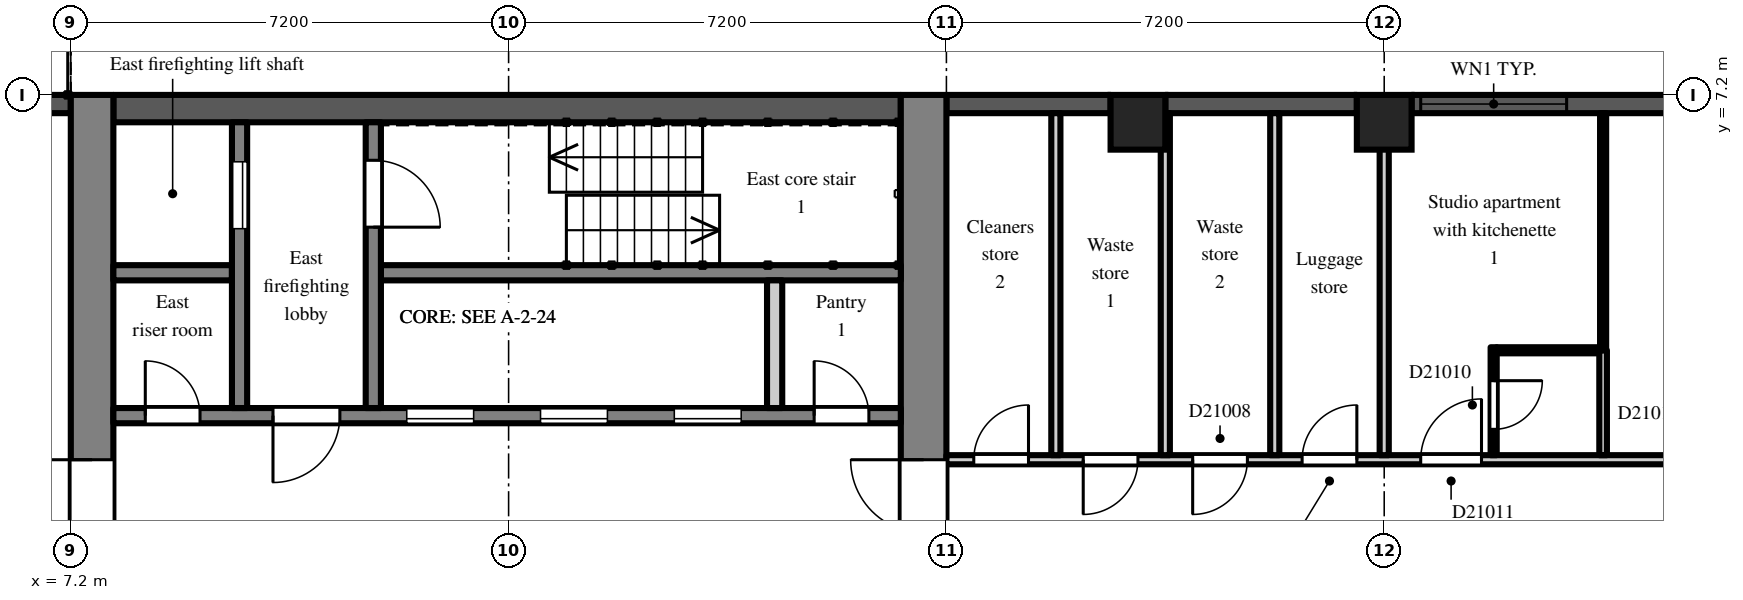
"""IFC4 building model, lengths in metres.
Left out: names, types, materials, properties, quantities, classifications, styles, units other than length and angle.
Written with IfcOpenShell. Run it as: python <this file> out.ifc"""

import sys

from ifc_helpers import new_model, si_unit, direction, frame, frame_2d, origin, origin_2d, place, context, subcontext, project, spatial, rectangle, extrude, element, fill, save


model = new_model("IFC4")
c1 = context("Model", 3, precision=1e-05, world=origin(), true_north=direction((0.0, 1.0)))
c2 = subcontext(c1, "Body", "Model", "MODEL_VIEW")
j1 = project(units=[si_unit("LENGTHUNIT", "METRE"), si_unit("PLANEANGLEUNIT", "RADIAN")], contexts=[c1])
p1 = place(None, origin())
s1 = spatial("IfcSite", under=j1, at=p1, CompositionType="ELEMENT")
p2 = place(p1, origin())
s2 = spatial("IfcBuilding", under=s1, at=p2, CompositionType="ELEMENT")
p3 = place(p2, frame((0.0, 0.0, 147.3)))
s3 = spatial("IfcBuildingStorey", under=s2, at=p3, CompositionType="ELEMENT", Elevation=147.3)
for number, where, z_axis, x_axis in (
    (1, (24.75, 6.75, 0.0), (0.0, 0.0, 1.0), (1.0, 0.0, 0.0)),
    (2, (28.8, 6.75, 0.0), (0.0, 0.0, 1.0), (1.0, 0.0, 0.0)),
):
    element("IfcColumn", number, at=place(p3, frame(where, z_axis=z_axis, x_axis=x_axis)), inside=s3, PredefinedType="COLUMN", context=c2, shape_type="SweptSolid", body=[
        extrude(rectangle(XDim=0.9, YDim=0.9, at=origin_2d()), origin(), (0.0, 0.0, 1.0), 3.0),
    ])
p4 = place(p3, frame((35.55, 7.05, 0.0), z_axis=(0.0, 0.0, 1.0), x_axis=(-1.0, 0.0, 0.0)))
e3 = element("IfcWall", 3, at=p4, inside=s3, PredefinedType="SOLIDWALL", context=c2, shape_type="SweptSolid", body=[
    extrude(rectangle(XDim=6.3, YDim=0.3, at=frame_2d((3.15, 0.0))), origin(), (0.0, 0.0, 1.0), 2.2),
])
p5 = place(p4, frame((3.75, 0.0, 0.2)))
e4 = element("IfcOpeningElement", 4, at=p5, cuts=e3, PredefinedType="OPENING", context=c2, shape_type="SweptSolid", body=[
    extrude(rectangle(XDim=2.4, YDim=1.85, at=frame_2d((1.2, 0.925))), frame((0.0, 0.16, 0.0), z_axis=(0.0, -1.0, 0.0), x_axis=(1.0, 0.0, 0.0)), (0.0, 0.0, 1.0), 0.32),
])
p6 = place(p3, frame((28.35, 7.05, 0.0), z_axis=(0.0, 0.0, 1.0), x_axis=(-1.0, 0.0, 0.0)))
e5 = element("IfcWall", 5, at=p6, inside=s3, PredefinedType="SOLIDWALL", context=c2, shape_type="SweptSolid", body=[
    extrude(rectangle(XDim=3.15, YDim=0.3, at=frame_2d((1.575, 0.0))), origin(), (0.0, 0.0, 1.0), 2.2),
])
p7 = place(p3, frame((24.3, 7.05, 0.0), z_axis=(0.0, 0.0, 1.0), x_axis=(-1.0, 0.0, 0.0)))
e6 = element("IfcWall", 6, at=p7, inside=s3, PredefinedType="SOLIDWALL", context=c2, shape_type="SweptSolid", body=[
    extrude(rectangle(XDim=2.7, YDim=0.3, at=frame_2d((1.35, 0.0))), origin(), (0.0, 0.0, 1.0), 2.2),
])
p8 = place(p3, frame((7.2, 7.05, 0.0), z_axis=(0.0, 0.0, 1.0), x_axis=(-1.0, 0.0, 0.0)))
e7 = element("IfcWall", 7, at=p8, inside=s3, PredefinedType="SOLIDWALL", context=c2, shape_type="SweptSolid", body=[
    extrude(rectangle(XDim=3.0, YDim=0.3, at=frame_2d((1.5, 0.0))), origin(), (0.0, 0.0, 1.0), 2.2),
])
p9 = place(p3, frame((7.55, -7.2, 0.0), z_axis=(0.0, 0.0, 1.0), x_axis=(0.0, 1.0, 0.0)))
e8 = element("IfcWall", 8, at=p9, inside=s3, PredefinedType="SHEAR", context=c2, shape_type="SweptSolid", body=[
    extrude(rectangle(XDim=14.4, YDim=0.7, at=frame_2d((7.2, 0.0))), origin(), (0.0, 0.0, 1.0), 2.6),
])
p10 = place(p9, frame((6.0, 0.0, 0.0)))
e9 = element("IfcOpeningElement", 9, at=p10, cuts=e8, PredefinedType="OPENING", context=c2, shape_type="SweptSolid", body=[
    extrude(rectangle(XDim=2.4, YDim=2.2, at=frame_2d((1.2, 1.1))), frame((0.0, 0.36, 0.0), z_axis=(0.0, -1.0, 0.0), x_axis=(1.0, 0.0, 0.0)), (0.0, 0.0, 1.0), 0.72),
])
p11 = place(p3, frame((21.225, -7.2, 0.0), z_axis=(0.0, 0.0, 1.0), x_axis=(0.0, 1.0, 0.0)))
e10 = element("IfcWall", 10, at=p11, inside=s3, PredefinedType="SHEAR", context=c2, shape_type="SweptSolid", body=[
    extrude(rectangle(XDim=14.4, YDim=0.75, at=frame_2d((7.2, 0.0))), origin(), (0.0, 0.0, 1.0), 2.6),
])
p12 = place(p11, frame((6.0, 0.0, 0.0)))
e11 = element("IfcOpeningElement", 11, at=p12, cuts=e10, PredefinedType="OPENING", context=c2, shape_type="SweptSolid", body=[
    extrude(rectangle(XDim=2.4, YDim=2.2, at=frame_2d((1.2, 1.1))), frame((0.0, 0.385, 0.0), z_axis=(0.0, -1.0, 0.0), x_axis=(1.0, 0.0, 0.0)), (0.0, 0.0, 1.0), 0.77),
])
p13 = place(p3, frame((7.9, 6.975, 0.0), z_axis=(0.0, 0.0, 1.0), x_axis=(1.0, 0.0, 0.0)))
e12 = element("IfcWall", 12, at=p13, inside=s3, PredefinedType="SHEAR", context=c2, shape_type="SweptSolid", body=[
    extrude(rectangle(XDim=12.95, YDim=0.45, at=frame_2d((6.475, 0.0))), origin(), (0.0, 0.0, 1.0), 2.6),
])
p14 = place(p3, frame((7.9, 1.925, 0.0), z_axis=(0.0, 0.0, 1.0), x_axis=(1.0, 0.0, 0.0)))
e13 = element("IfcWall", 13, at=p14, inside=s3, PredefinedType="SHEAR", context=c2, shape_type="SweptSolid", body=[
    extrude(rectangle(XDim=12.95, YDim=0.25, at=frame_2d((6.475, 0.0))), origin(), (0.0, 0.0, 1.0), 2.6),
])
p15 = place(p14, frame((4.825, 0.0, 0.0)))
e14 = element("IfcOpeningElement", 14, at=p15, cuts=e13, PredefinedType="OPENING", context=c2, shape_type="SweptSolid", body=[
    extrude(rectangle(XDim=1.1, YDim=2.1, at=frame_2d((0.55, 1.05))), frame((0.0, 0.135, 0.0), z_axis=(0.0, -1.0, 0.0), x_axis=(1.0, 0.0, 0.0)), (0.0, 0.0, 1.0), 0.27),
])
p16 = place(p14, frame((7.025, 0.0, 0.0)))
e15 = element("IfcOpeningElement", 15, at=p16, cuts=e13, PredefinedType="OPENING", context=c2, shape_type="SweptSolid", body=[
    extrude(rectangle(XDim=1.1, YDim=2.1, at=frame_2d((0.55, 1.05))), frame((0.0, 0.135, 0.0), z_axis=(0.0, -1.0, 0.0), x_axis=(1.0, 0.0, 0.0)), (0.0, 0.0, 1.0), 0.27),
])
p17 = place(p14, frame((9.225, 0.0, 0.0)))
e16 = element("IfcOpeningElement", 16, at=p17, cuts=e13, PredefinedType="OPENING", context=c2, shape_type="SweptSolid", body=[
    extrude(rectangle(XDim=1.1, YDim=2.1, at=frame_2d((0.55, 1.05))), frame((0.0, 0.135, 0.0), z_axis=(0.0, -1.0, 0.0), x_axis=(1.0, 0.0, 0.0)), (0.0, 0.0, 1.0), 0.27),
])
p18 = place(p14, frame((0.525, 0.0, 0.0)))
e17 = element("IfcOpeningElement", 17, at=p18, cuts=e13, PredefinedType="OPENING", context=c2, shape_type="SweptSolid", body=[
    extrude(rectangle(XDim=0.9, YDim=2.1, at=frame_2d((0.45, 1.05))), frame((0.0, 0.135, 0.0), z_axis=(0.0, -1.0, 0.0), x_axis=(1.0, 0.0, 0.0)), (0.0, 0.0, 1.0), 0.27),
])
p19 = place(p14, frame((2.625, 0.0, 0.0)))
e18 = element("IfcOpeningElement", 18, at=p19, cuts=e13, PredefinedType="OPENING", context=c2, shape_type="SweptSolid", body=[
    extrude(rectangle(XDim=1.1, YDim=2.1, at=frame_2d((0.55, 1.05))), frame((0.0, 0.135, 0.0), z_axis=(0.0, -1.0, 0.0), x_axis=(1.0, 0.0, 0.0)), (0.0, 0.0, 1.0), 0.27),
])
p20 = place(p14, frame((11.525, 0.0, 0.0)))
e19 = element("IfcOpeningElement", 19, at=p20, cuts=e13, PredefinedType="OPENING", context=c2, shape_type="SweptSolid", body=[
    extrude(rectangle(XDim=0.9, YDim=2.1, at=frame_2d((0.45, 1.05))), frame((0.0, 0.135, 0.0), z_axis=(0.0, -1.0, 0.0), x_axis=(1.0, 0.0, 0.0)), (0.0, 0.0, 1.0), 0.27),
])
p21 = place(p3, frame((7.9, 4.275, 0.0), z_axis=(0.0, 0.0, 1.0), x_axis=(1.0, 0.0, 0.0)))
e20 = element("IfcWall", 20, at=p21, inside=s3, PredefinedType="SHEAR", context=c2, shape_type="SweptSolid", body=[
    extrude(rectangle(XDim=1.95, YDim=0.25, at=frame_2d((0.975, 0.0))), origin(), (0.0, 0.0, 1.0), 2.6),
])
p22 = place(p3, frame((12.3, 4.275, 0.0), z_axis=(0.0, 0.0, 1.0), x_axis=(1.0, 0.0, 0.0)))
e21 = element("IfcWall", 21, at=p22, inside=s3, PredefinedType="SHEAR", context=c2, shape_type="SweptSolid", body=[
    extrude(rectangle(XDim=8.55, YDim=0.25, at=frame_2d((4.275, 0.0))), origin(), (0.0, 0.0, 1.0), 2.6),
])
p23 = place(p3, frame((9.975, 2.05, 0.0), z_axis=(0.0, 0.0, 1.0), x_axis=(0.0, 1.0, 0.0)))
e22 = element("IfcWall", 22, at=p23, inside=s3, PredefinedType="SHEAR", context=c2, shape_type="SweptSolid", body=[
    extrude(rectangle(XDim=4.7, YDim=0.25, at=frame_2d((2.35, 0.0))), origin(), (0.0, 0.0, 1.0), 2.6),
])
p24 = place(p23, frame((2.95, 0.0, 0.0)))
e23 = element("IfcOpeningElement", 23, at=p24, cuts=e22, PredefinedType="OPENING", context=c2, shape_type="SweptSolid", body=[
    extrude(rectangle(XDim=1.1, YDim=2.1, at=frame_2d((0.55, 1.05))), frame((0.0, 0.135, 0.0), z_axis=(0.0, -1.0, 0.0), x_axis=(1.0, 0.0, 0.0)), (0.0, 0.0, 1.0), 0.27),
])
p25 = place(p3, frame((12.175, 2.05, 0.0), z_axis=(0.0, 0.0, 1.0), x_axis=(0.0, 1.0, 0.0)))
e24 = element("IfcWall", 24, at=p25, inside=s3, PredefinedType="SHEAR", context=c2, shape_type="SweptSolid", body=[
    extrude(rectangle(XDim=4.7, YDim=0.25, at=frame_2d((2.35, 0.0))), origin(), (0.0, 0.0, 1.0), 2.6),
])
p26 = place(p25, frame((2.975, 0.0, 0.0)))
e25 = element("IfcOpeningElement", 25, at=p26, cuts=e24, PredefinedType="OPENING", context=c2, shape_type="SweptSolid", body=[
    extrude(rectangle(XDim=1.1, YDim=2.1, at=frame_2d((0.55, 1.05))), frame((0.0, 0.135, 0.0), z_axis=(0.0, -1.0, 0.0), x_axis=(1.0, 0.0, 0.0)), (0.0, 0.0, 1.0), 0.27),
])
p27 = place(p3, frame((18.775, 2.05, 0.0), z_axis=(0.0, 0.0, 1.0), x_axis=(0.0, 1.0, 0.0)))
e26 = element("IfcWall", 26, at=p27, inside=s3, PredefinedType="PARTITIONING", context=c2, shape_type="SweptSolid", body=[
    extrude(rectangle(XDim=2.1, YDim=0.25, at=frame_2d((1.05, 0.0))), origin(), (0.0, 0.0, 1.0), 2.6),
])
p28 = place(p3, frame((21.6, 1.2, 0.0), z_axis=(0.0, 0.0, 1.0), x_axis=(1.0, 0.0, 0.0)))
e27 = element("IfcWall", 27, at=p28, inside=s3, PredefinedType="PARTITIONING", context=c2, shape_type="SweptSolid", body=[
    extrude(rectangle(XDim=14.9, YDim=0.15, at=frame_2d((7.45, 0.0))), origin(), (0.0, 0.0, 1.0), 2.6),
])
p29 = place(p28, frame((0.45, 0.0, 0.0)))
e28 = element("IfcOpeningElement", 28, at=p29, cuts=e27, PredefinedType="OPENING", context=c2, shape_type="SweptSolid", body=[
    extrude(rectangle(XDim=0.9, YDim=2.1, at=frame_2d((0.45, 1.05))), frame((0.0, 0.085, 0.0), z_axis=(0.0, -1.0, 0.0), x_axis=(1.0, 0.0, 0.0)), (0.0, 0.0, 1.0), 0.17),
])
p30 = place(p28, frame((2.25, 0.0, 0.0)))
e29 = element("IfcOpeningElement", 29, at=p30, cuts=e27, PredefinedType="OPENING", context=c2, shape_type="SweptSolid", body=[
    extrude(rectangle(XDim=0.9, YDim=2.1, at=frame_2d((0.45, 1.05))), frame((0.0, 0.085, 0.0), z_axis=(0.0, -1.0, 0.0), x_axis=(1.0, 0.0, 0.0)), (0.0, 0.0, 1.0), 0.17),
])
p31 = place(p28, frame((4.05, 0.0, 0.0)))
e30 = element("IfcOpeningElement", 30, at=p31, cuts=e27, PredefinedType="OPENING", context=c2, shape_type="SweptSolid", body=[
    extrude(rectangle(XDim=0.9, YDim=2.1, at=frame_2d((0.45, 1.05))), frame((0.0, 0.085, 0.0), z_axis=(0.0, -1.0, 0.0), x_axis=(1.0, 0.0, 0.0)), (0.0, 0.0, 1.0), 0.17),
])
p32 = place(p28, frame((5.85, 0.0, 0.0)))
e31 = element("IfcOpeningElement", 31, at=p32, cuts=e27, PredefinedType="OPENING", context=c2, shape_type="SweptSolid", body=[
    extrude(rectangle(XDim=0.9, YDim=2.1, at=frame_2d((0.45, 1.05))), frame((0.0, 0.085, 0.0), z_axis=(0.0, -1.0, 0.0), x_axis=(1.0, 0.0, 0.0)), (0.0, 0.0, 1.0), 0.17),
])
p33 = place(p28, frame((7.8, 0.0, 0.0)))
e32 = element("IfcOpeningElement", 32, at=p33, cuts=e27, PredefinedType="OPENING", context=c2, shape_type="SweptSolid", body=[
    extrude(rectangle(XDim=1.0, YDim=2.1, at=frame_2d((0.5, 1.05))), frame((0.0, 0.085, 0.0), z_axis=(0.0, -1.0, 0.0), x_axis=(1.0, 0.0, 0.0)), (0.0, 0.0, 1.0), 0.17),
])
p34 = place(p28, frame((11.95, 0.0, 0.0)))
e33 = element("IfcOpeningElement", 33, at=p34, cuts=e27, PredefinedType="OPENING", context=c2, shape_type="SweptSolid", body=[
    extrude(rectangle(XDim=1.8, YDim=2.1, at=frame_2d((0.9, 1.05))), frame((0.0, 0.085, 0.0), z_axis=(0.0, -1.0, 0.0), x_axis=(1.0, 0.0, 0.0)), (0.0, 0.0, 1.0), 0.17),
])
for number, where, z_axis, x_axis in (
    (34, (23.4, 1.275, 0.0), (0.0, 0.0, 1.0), (0.0, 1.0, 0.0)),
    (35, (25.2, 1.275, 0.0), (0.0, 0.0, 1.0), (0.0, 1.0, 0.0)),
    (36, (27.0, 1.275, 0.0), (0.0, 0.0, 1.0), (0.0, 1.0, 0.0)),
    (37, (28.8, 1.275, 0.0), (0.0, 0.0, 1.0), (0.0, 1.0, 0.0)),
):
    element("IfcWall", number, at=place(p3, frame(where, z_axis=z_axis, x_axis=x_axis)), inside=s3, PredefinedType="PARTITIONING", context=c2, shape_type="SweptSolid", body=[
        extrude(rectangle(XDim=5.625, YDim=0.15, at=frame_2d((2.812, 0.0))), origin(), (0.0, 0.0, 1.0), 2.6),
    ])
p35 = place(p3, frame((30.6, 1.275, 0.0), z_axis=(0.0, 0.0, 1.0), x_axis=(0.0, 1.0, 0.0)))
e38 = element("IfcWall", 38, at=p35, inside=s3, PredefinedType="PARTITIONING", context=c2, shape_type="SweptSolid", body=[
    extrude(rectangle(XDim=1.775, YDim=0.1, at=frame_2d((0.888, 0.0))), origin(), (0.0, 0.0, 1.0), 2.6),
])
p36 = place(p35, frame((0.425, 0.0, 0.0)))
e39 = element("IfcOpeningElement", 39, at=p36, cuts=e38, PredefinedType="OPENING", context=c2, shape_type="SweptSolid", body=[
    extrude(rectangle(XDim=0.8, YDim=2.1, at=frame_2d((0.4, 1.05))), frame((0.0, 0.06, 0.0), z_axis=(0.0, -1.0, 0.0), x_axis=(1.0, 0.0, 0.0)), (0.0, 0.0, 1.0), 0.12),
])
p37 = place(p3, frame((30.65, 3.0, 0.0), z_axis=(0.0, 0.0, 1.0), x_axis=(1.0, 0.0, 0.0)))
e40 = element("IfcWall", 40, at=p37, inside=s3, PredefinedType="PARTITIONING", context=c2, shape_type="SweptSolid", body=[
    extrude(rectangle(XDim=1.688, YDim=0.1, at=frame_2d((0.844, 0.0))), origin(), (0.0, 0.0, 1.0), 2.6),
])
p38 = place(p3, frame((32.4, 1.275, 0.0), z_axis=(0.0, 0.0, 1.0), x_axis=(0.0, 1.0, 0.0)))
e41 = element("IfcWall", 41, at=p38, inside=s3, PredefinedType="PARTITIONING", context=c2, shape_type="SweptSolid", body=[
    extrude(rectangle(XDim=1.725, YDim=0.125, at=frame_2d((0.863, 0.0))), origin(), (0.0, 0.0, 1.0), 2.6),
])
p39 = place(p3, frame((32.4, 3.0, 0.0), z_axis=(0.0, 0.0, 1.0), x_axis=(0.0, 1.0, 0.0)))
e42 = element("IfcWall", 42, at=p39, inside=s3, PredefinedType="PARTITIONING", context=c2, shape_type="SweptSolid", body=[
    extrude(rectangle(XDim=3.9, YDim=0.1, at=frame_2d((1.95, 0.0))), origin(), (0.0, 0.0, 1.0), 2.6),
])
p40 = place(p5, origin())
e43 = element("IfcWindow", 43, at=p40, inside=s3, PartitioningType="SINGLE_PANEL", PredefinedType="WINDOW", context=c2, shape_type="SweptSolid", body=[
    extrude(rectangle(XDim=2.4, YDim=1.85, at=frame_2d((1.2, 0.925))), frame((0.0, 0.03, 0.0), z_axis=(0.0, -1.0, 0.0), x_axis=(1.0, 0.0, 0.0)), (0.0, 0.0, 1.0), 0.06),
])
fill(e4, e43)
p41 = place(p15, origin())
e44 = element("IfcDoor", 44, at=p41, inside=s3, OperationType="SLIDING_TO_LEFT", PredefinedType="DOOR", context=c2, shape_type="SweptSolid", body=[
    extrude(rectangle(XDim=1.1, YDim=2.1, at=frame_2d((0.55, 1.05))), frame((0.0, 0.025, 0.0), z_axis=(0.0, -1.0, 0.0), x_axis=(1.0, 0.0, 0.0)), (0.0, 0.0, 1.0), 0.05),
])
fill(e14, e44)
p42 = place(p16, origin())
e45 = element("IfcDoor", 45, at=p42, inside=s3, OperationType="SLIDING_TO_LEFT", PredefinedType="DOOR", context=c2, shape_type="SweptSolid", body=[
    extrude(rectangle(XDim=1.1, YDim=2.1, at=frame_2d((0.55, 1.05))), frame((0.0, 0.025, 0.0), z_axis=(0.0, -1.0, 0.0), x_axis=(1.0, 0.0, 0.0)), (0.0, 0.0, 1.0), 0.05),
])
fill(e15, e45)
p43 = place(p17, origin())
e46 = element("IfcDoor", 46, at=p43, inside=s3, OperationType="SLIDING_TO_LEFT", PredefinedType="DOOR", context=c2, shape_type="SweptSolid", body=[
    extrude(rectangle(XDim=1.1, YDim=2.1, at=frame_2d((0.55, 1.05))), frame((0.0, 0.025, 0.0), z_axis=(0.0, -1.0, 0.0), x_axis=(1.0, 0.0, 0.0)), (0.0, 0.0, 1.0), 0.05),
])
fill(e16, e46)
p44 = place(p24, origin())
e47 = element("IfcDoor", 47, at=p44, inside=s3, OperationType="SLIDING_TO_LEFT", PredefinedType="DOOR", context=c2, shape_type="SweptSolid", body=[
    extrude(rectangle(XDim=1.1, YDim=2.1, at=frame_2d((0.55, 1.05))), frame((0.0, 0.025, 0.0), z_axis=(0.0, -1.0, 0.0), x_axis=(1.0, 0.0, 0.0)), (0.0, 0.0, 1.0), 0.05),
])
fill(e23, e47)
p45 = place(p26, frame((1.1, 0.0, 0.0), z_axis=(0.0, 0.0, 1.0), x_axis=(-1.0, 0.0, 0.0)))
e48 = element("IfcDoor", 48, at=p45, inside=s3, OperationType="SINGLE_SWING_RIGHT", PredefinedType="DOOR", context=c2, shape_type="SweptSolid", body=[
    extrude(rectangle(XDim=1.1, YDim=2.1, at=frame_2d((0.55, 1.05))), frame((0.0, 0.025, 0.0), z_axis=(0.0, -1.0, 0.0), x_axis=(1.0, 0.0, 0.0)), (0.0, 0.0, 1.0), 0.05),
])
fill(e25, e48)
p46 = place(p18, origin())
e49 = element("IfcDoor", 49, at=p46, inside=s3, OperationType="SINGLE_SWING_LEFT", PredefinedType="DOOR", context=c2, shape_type="SweptSolid", body=[
    extrude(rectangle(XDim=0.9, YDim=2.1, at=frame_2d((0.45, 1.05))), frame((0.0, 0.025, 0.0), z_axis=(0.0, -1.0, 0.0), x_axis=(1.0, 0.0, 0.0)), (0.0, 0.0, 1.0), 0.05),
])
fill(e17, e49)
p47 = place(p19, frame((1.1, 0.0, 0.0), z_axis=(0.0, 0.0, 1.0), x_axis=(-1.0, 0.0, 0.0)))
e50 = element("IfcDoor", 50, at=p47, inside=s3, OperationType="SINGLE_SWING_RIGHT", PredefinedType="DOOR", context=c2, shape_type="SweptSolid", body=[
    extrude(rectangle(XDim=1.1, YDim=2.1, at=frame_2d((0.55, 1.05))), frame((0.0, 0.025, 0.0), z_axis=(0.0, -1.0, 0.0), x_axis=(1.0, 0.0, 0.0)), (0.0, 0.0, 1.0), 0.05),
])
fill(e18, e50)
p48 = place(p10, origin())
e51 = element("IfcDoor", 51, at=p48, inside=s3, OperationType="DOUBLE_DOOR_DOUBLE_SWING", PredefinedType="DOOR", context=c2, shape_type="SweptSolid", body=[
    extrude(rectangle(XDim=2.4, YDim=2.2, at=frame_2d((1.2, 1.1))), frame((0.0, 0.025, 0.0), z_axis=(0.0, -1.0, 0.0), x_axis=(1.0, 0.0, 0.0)), (0.0, 0.0, 1.0), 0.05),
])
fill(e9, e51)
p49 = place(p12, origin())
e52 = element("IfcDoor", 52, at=p49, inside=s3, OperationType="DOUBLE_DOOR_DOUBLE_SWING", PredefinedType="DOOR", context=c2, shape_type="SweptSolid", body=[
    extrude(rectangle(XDim=2.4, YDim=2.2, at=frame_2d((1.2, 1.1))), frame((0.0, 0.025, 0.0), z_axis=(0.0, -1.0, 0.0), x_axis=(1.0, 0.0, 0.0)), (0.0, 0.0, 1.0), 0.05),
])
fill(e11, e52)
p50 = place(p20, origin())
e53 = element("IfcDoor", 53, at=p50, inside=s3, OperationType="SINGLE_SWING_LEFT", PredefinedType="DOOR", context=c2, shape_type="SweptSolid", body=[
    extrude(rectangle(XDim=0.9, YDim=2.1, at=frame_2d((0.45, 1.05))), frame((0.0, 0.025, 0.0), z_axis=(0.0, -1.0, 0.0), x_axis=(1.0, 0.0, 0.0)), (0.0, 0.0, 1.0), 0.05),
])
fill(e19, e53)
p51 = place(p29, origin())
e54 = element("IfcDoor", 54, at=p51, inside=s3, OperationType="SINGLE_SWING_RIGHT", PredefinedType="DOOR", context=c2, shape_type="SweptSolid", body=[
    extrude(rectangle(XDim=0.9, YDim=2.1, at=frame_2d((0.45, 1.05))), frame((0.0, 0.025, 0.0), z_axis=(0.0, -1.0, 0.0), x_axis=(1.0, 0.0, 0.0)), (0.0, 0.0, 1.0), 0.05),
])
fill(e28, e54)
p52 = place(p30, frame((0.9, 0.0, 0.0), z_axis=(0.0, 0.0, 1.0), x_axis=(-1.0, 0.0, 0.0)))
e55 = element("IfcDoor", 55, at=p52, inside=s3, OperationType="SINGLE_SWING_RIGHT", PredefinedType="DOOR", context=c2, shape_type="SweptSolid", body=[
    extrude(rectangle(XDim=0.9, YDim=2.1, at=frame_2d((0.45, 1.05))), frame((0.0, 0.025, 0.0), z_axis=(0.0, -1.0, 0.0), x_axis=(1.0, 0.0, 0.0)), (0.0, 0.0, 1.0), 0.05),
])
fill(e29, e55)
p53 = place(p31, frame((0.9, 0.0, 0.0), z_axis=(0.0, 0.0, 1.0), x_axis=(-1.0, 0.0, 0.0)))
e56 = element("IfcDoor", 56, at=p53, inside=s3, OperationType="SINGLE_SWING_RIGHT", PredefinedType="DOOR", context=c2, shape_type="SweptSolid", body=[
    extrude(rectangle(XDim=0.9, YDim=2.1, at=frame_2d((0.45, 1.05))), frame((0.0, 0.025, 0.0), z_axis=(0.0, -1.0, 0.0), x_axis=(1.0, 0.0, 0.0)), (0.0, 0.0, 1.0), 0.05),
])
fill(e30, e56)
p54 = place(p32, origin())
e57 = element("IfcDoor", 57, at=p54, inside=s3, OperationType="SINGLE_SWING_RIGHT", PredefinedType="DOOR", context=c2, shape_type="SweptSolid", body=[
    extrude(rectangle(XDim=0.9, YDim=2.1, at=frame_2d((0.45, 1.05))), frame((0.0, 0.025, 0.0), z_axis=(0.0, -1.0, 0.0), x_axis=(1.0, 0.0, 0.0)), (0.0, 0.0, 1.0), 0.05),
])
fill(e31, e57)
p55 = place(p36, frame((0.8, 0.0, 0.0), z_axis=(0.0, 0.0, 1.0), x_axis=(-1.0, 0.0, 0.0)))
e58 = element("IfcDoor", 58, at=p55, inside=s3, OperationType="SINGLE_SWING_LEFT", PredefinedType="DOOR", context=c2, shape_type="SweptSolid", body=[
    extrude(rectangle(XDim=0.8, YDim=2.1, at=frame_2d((0.4, 1.05))), frame((0.0, 0.025, 0.0), z_axis=(0.0, -1.0, 0.0), x_axis=(1.0, 0.0, 0.0)), (0.0, 0.0, 1.0), 0.05),
])
fill(e39, e58)
p56 = place(p33, origin())
e59 = element("IfcDoor", 59, at=p56, inside=s3, OperationType="SINGLE_SWING_RIGHT", PredefinedType="DOOR", context=c2, shape_type="SweptSolid", body=[
    extrude(rectangle(XDim=1.0, YDim=2.1, at=frame_2d((0.5, 1.05))), frame((0.0, 0.025, 0.0), z_axis=(0.0, -1.0, 0.0), x_axis=(1.0, 0.0, 0.0)), (0.0, 0.0, 1.0), 0.05),
])
fill(e32, e59)
save(model, sys.argv[1])
